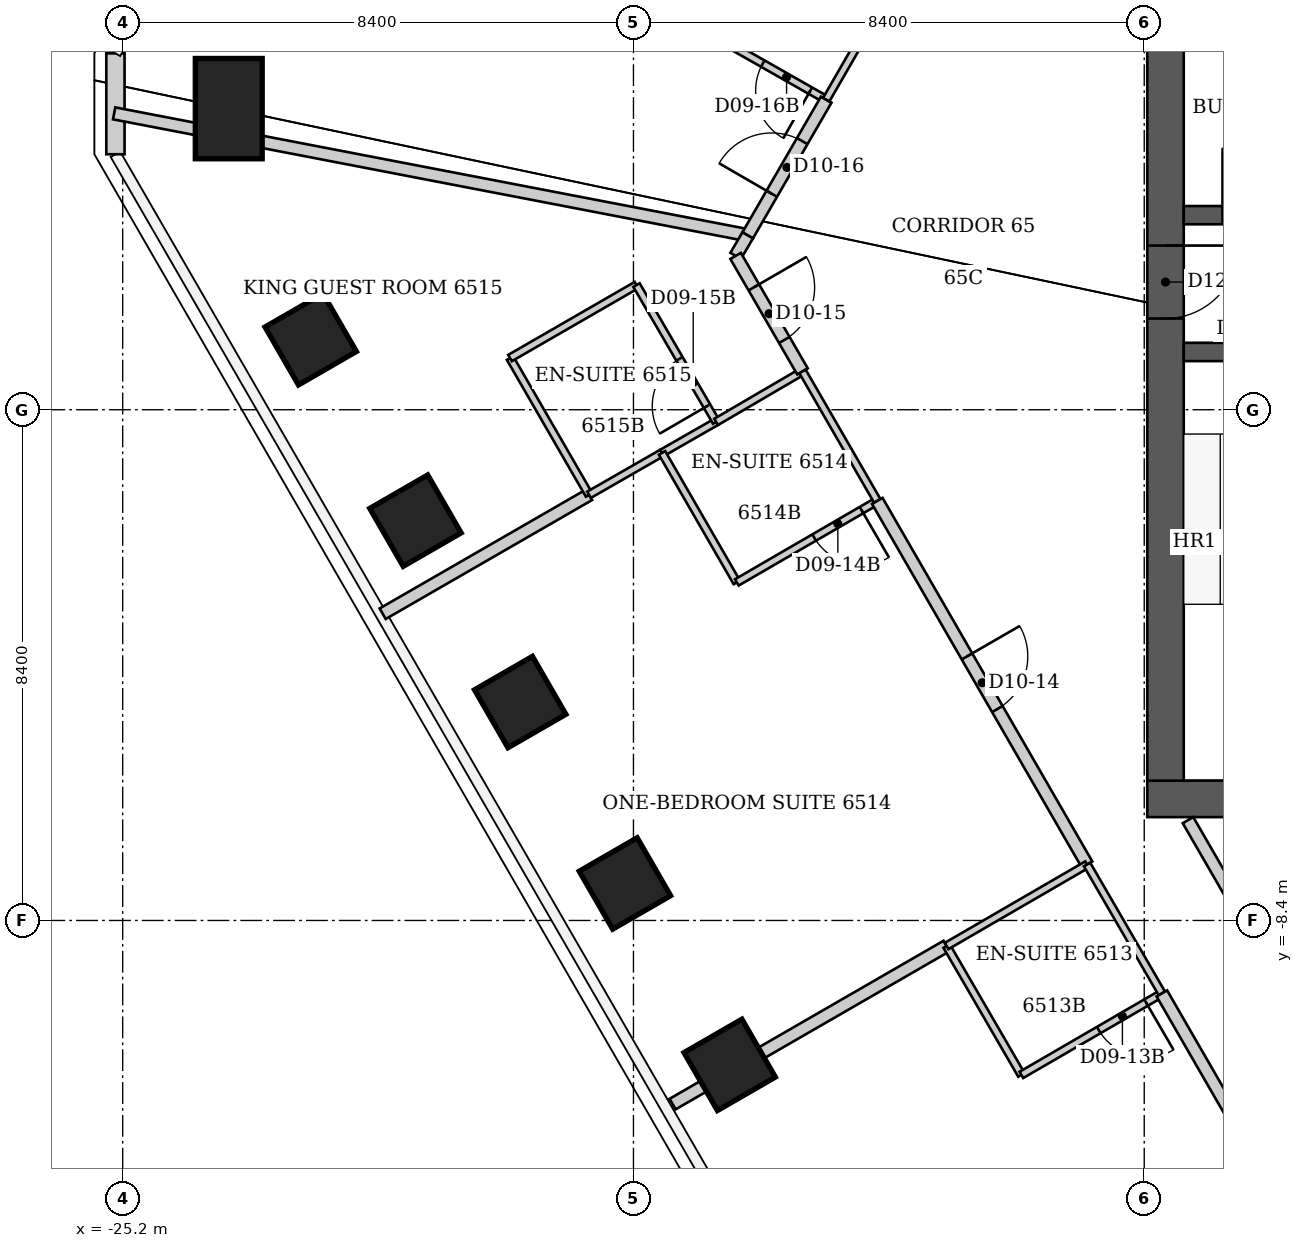
"""IFC4 building model, lengths in metres.
Left out: names, types, materials, properties, quantities, classifications, styles, units other than length and angle.
Written with IfcOpenShell. Run it as: python <this file> out.ifc"""

import sys

from ifc_helpers import new_model, si_unit, direction, frame, frame_2d, origin, origin_2d, place, context, subcontext, project, spatial, rectangle, extrude, element, fill, save


model = new_model("IFC4")
c1 = context("Model", 3, precision=1e-05, world=origin(), true_north=direction((0.0, 1.0)))
c2 = subcontext(c1, "Body", "Model", "MODEL_VIEW")
j1 = project(units=[si_unit("LENGTHUNIT", "METRE"), si_unit("PLANEANGLEUNIT", "RADIAN")], contexts=[c1])
p1 = place(None, origin())
s1 = spatial("IfcSite", under=j1, at=p1, CompositionType="ELEMENT")
p2 = place(p1, origin())
s2 = spatial("IfcBuilding", under=s1, at=p2, CompositionType="ELEMENT")
p3 = place(p2, frame((0.0, 0.0, 260.8)))
s3 = spatial("IfcBuildingStorey", under=s2, at=p3, CompositionType="ELEMENT", Elevation=260.8)
for number, where, z_axis, x_axis in (
    (1, (-15.218, -10.775, 0.0), (0.0, 0.0, 1.0), (-0.866, -0.5, 0.0)),
    (2, (-16.94, -7.792, 0.0), (0.0, 0.0, 1.0), (-0.866, -0.5, 0.0)),
    (3, (-18.663, -4.808, 0.0), (0.0, 0.0, 1.0), (-0.866, -0.5, 0.0)),
    (4, (-20.385, -1.824, 0.0), (0.0, 0.0, 1.0), (-0.866, -0.5, 0.0)),
    (5, (-22.108, 1.159, 0.0), (0.0, 0.0, 1.0), (-0.866, -0.5, 0.0)),
):
    element("IfcColumn", number, at=place(p3, frame(where, z_axis=z_axis, x_axis=x_axis)), inside=s3, PredefinedType="COLUMN", context=c2, shape_type="SweptSolid", body=[
        extrude(rectangle(XDim=1.1, YDim=1.1, at=origin_2d()), origin(), (0.0, 0.0, 1.0), 3.8),
    ])
p4 = place(p3, frame((-23.456, 4.952, 0.0), z_axis=(0.0, 0.0, 1.0), x_axis=(-1.0, 0.0, 0.0)))
e6 = element("IfcColumn", 6, at=p4, inside=s3, PredefinedType="COLUMN", context=c2, shape_type="SweptSolid", body=[
    extrude(rectangle(XDim=1.1, YDim=1.65, at=origin_2d()), origin(), (0.0, 0.0, 1.0), 3.8),
])
p5 = place(p3, frame((-8.35, -6.4, 0.0), z_axis=(0.0, 0.0, 1.0), x_axis=(1.0, 0.0, 0.0)))
e7 = element("IfcWall", 7, at=p5, inside=s3, PredefinedType="SHEAR", context=c2, shape_type="SweptSolid", body=[
    extrude(rectangle(XDim=16.7, YDim=0.6, at=frame_2d((8.35, 0.0))), origin(), (0.0, 0.0, 1.0), 3.8),
])
p6 = place(p3, frame((-8.05, -6.1, 0.0), z_axis=(0.0, 0.0, 1.0), x_axis=(0.0, 1.0, 0.0)))
e8 = element("IfcWall", 8, at=p6, inside=s3, PredefinedType="SHEAR", context=c2, shape_type="SweptSolid", body=[
    extrude(rectangle(XDim=12.2, YDim=0.6, at=frame_2d((6.1, 0.0))), origin(), (0.0, 0.0, 1.0), 3.8),
])
p7 = place(p6, frame((7.6, 0.0, 0.0)))
e9 = element("IfcOpeningElement", 9, at=p7, cuts=e8, PredefinedType="OPENING", context=c2, shape_type="SweptSolid", body=[
    extrude(rectangle(XDim=1.2, YDim=2.2, at=frame_2d((0.6, 1.1))), frame((0.0, 0.3, 0.0), z_axis=(0.0, -1.0, 0.0), x_axis=(1.0, 0.0, 0.0)), (0.0, 0.0, 1.0), 0.6),
])
p8 = place(p3, frame((-7.75, 0.95, 0.0), z_axis=(0.0, 0.0, 1.0), x_axis=(1.0, 0.0, 0.0)))
e10 = element("IfcWall", 10, at=p8, inside=s3, PredefinedType="SHEAR", context=c2, shape_type="SweptSolid", body=[
    extrude(rectangle(XDim=3.0, YDim=0.3, at=frame_2d((1.5, 0.0))), origin(), (0.0, 0.0, 1.0), 3.8),
])
p9 = place(p8, frame((0.85, 0.0, 0.0)))
e11 = element("IfcOpeningElement", 11, at=p9, cuts=e10, PredefinedType="OPENING", context=c2, shape_type="SweptSolid", body=[
    extrude(rectangle(XDim=1.0, YDim=2.2, at=frame_2d((0.5, 1.1))), frame((0.0, 0.15, 0.0), z_axis=(0.0, -1.0, 0.0), x_axis=(1.0, 0.0, 0.0)), (0.0, 0.0, 1.0), 0.3),
])
p10 = place(p3, frame((-7.75, 3.2, 0.0), z_axis=(0.0, 0.0, 1.0), x_axis=(1.0, 0.0, 0.0)))
e12 = element("IfcWall", 12, at=p10, inside=s3, PredefinedType="SHEAR", context=c2, shape_type="SweptSolid", body=[
    extrude(rectangle(XDim=15.5, YDim=0.3, at=frame_2d((7.75, 0.0))), origin(), (0.0, 0.0, 1.0), 3.8),
])
p11 = place(p10, frame((0.637, 0.0, 0.0)))
e13 = element("IfcOpeningElement", 13, at=p11, cuts=e12, PredefinedType="OPENING", context=c2, shape_type="SweptSolid", body=[
    extrude(rectangle(XDim=1.1, YDim=2.2, at=frame_2d((0.55, 1.1))), frame((0.0, 0.15, 0.0), z_axis=(0.0, -1.0, 0.0), x_axis=(1.0, 0.0, 0.0)), (0.0, 0.0, 1.0), 0.3),
])
p12 = place(p10, frame((3.262, 0.0, 0.0)))
e14 = element("IfcOpeningElement", 14, at=p12, cuts=e12, PredefinedType="OPENING", context=c2, shape_type="SweptSolid", body=[
    extrude(rectangle(XDim=1.1, YDim=2.2, at=frame_2d((0.55, 1.1))), frame((0.0, 0.15, 0.0), z_axis=(0.0, -1.0, 0.0), x_axis=(1.0, 0.0, 0.0)), (0.0, 0.0, 1.0), 0.3),
])
p13 = place(p3, frame((-25.319, 4.202, 0.0), z_axis=(0.0, 0.0, 1.0), x_axis=(0.0, 1.0, 0.0)))
e15 = element("IfcWall", 15, at=p13, inside=s3, PredefinedType="SOLIDWALL", context=c2, shape_type="SweptSolid", body=[
    extrude(rectangle(XDim=1.66, YDim=0.3, at=frame_2d((0.83, 0.0))), origin(), (0.0, 0.0, 1.0), 3.64),
])
p14 = place(p3, frame((-25.341, 4.874, 0.0), z_axis=(0.0, 0.0, 1.0), x_axis=(0.982001168061, -0.188874841966, 0.0)))
e16 = element("IfcWall", 16, at=p14, inside=s3, PredefinedType="PARTITIONING", context=c2, shape_type="SweptSolid", body=[
    extrude(rectangle(XDim=10.557, YDim=0.2, at=frame_2d((5.278, 0.0))), origin(), (0.0, 0.0, 1.0), 3.64),
])
p15 = place(p3, frame((-20.924, -3.355, 0.0), z_axis=(0.0, 0.0, 1.0), x_axis=(0.866380602512, 0.49938427247, 0.0)))
e17 = element("IfcWall", 17, at=p15, inside=s3, PredefinedType="PARTITIONING", context=c2, shape_type="SweptSolid", body=[
    extrude(rectangle(XDim=3.917, YDim=0.2, at=frame_2d((1.958, 0.0))), origin(), (0.0, 0.0, 1.0), 3.64),
])
p16 = place(p3, frame((-18.83, 0.85, 0.0), z_axis=(0.0, 0.0, 1.0), x_axis=(0.50025099007, -0.865880446098, 0.0)))
e18 = element("IfcWall", 18, at=p16, inside=s3, PredefinedType="PARTITIONING", context=c2, shape_type="SweptSolid", body=[
    extrude(rectangle(XDim=2.599, YDim=0.12, at=frame_2d((1.299, 0.0))), origin(), (0.0, 0.0, 1.0), 3.64),
])
p17 = place(p3, frame((-17.531, -1.399, 0.0), z_axis=(0.0, 0.0, 1.0), x_axis=(0.867308096735, 0.497771700017, 0.0)))
e19 = element("IfcWall", 19, at=p17, inside=s3, PredefinedType="PARTITIONING", context=c2, shape_type="SweptSolid", body=[
    extrude(rectangle(XDim=1.384, YDim=0.12, at=frame_2d((0.692, 0.0))), origin(), (0.0, 0.0, 1.0), 3.64),
])
p18 = place(p3, frame((-16.75, 2.05, 0.0), z_axis=(0.0, 0.0, 1.0), x_axis=(-0.866202511239, -0.499693115345, 0.0)))
e20 = element("IfcWall", 20, at=p18, inside=s3, PredefinedType="PARTITIONING", context=c2, shape_type="SweptSolid", body=[
    extrude(rectangle(XDim=2.401, YDim=0.12, at=frame_2d((1.201, 0.0))), origin(), (0.0, 0.0, 1.0), 3.64),
])
p19 = place(p3, frame((-16.33, -0.71, 0.0), z_axis=(0.0, 0.0, 1.0), x_axis=(0.867671417222, 0.497138121387, 0.0)))
e21 = element("IfcWall", 21, at=p19, inside=s3, PredefinedType="PARTITIONING", context=c2, shape_type="SweptSolid", body=[
    extrude(rectangle(XDim=1.026, YDim=0.12, at=frame_2d((0.513, 0.0))), origin(), (0.0, 0.0, 1.0), 3.64),
])
p20 = place(p3, frame((-16.33, -0.71, 0.0), z_axis=(0.0, 0.0, 1.0), x_axis=(0.500046071023, -0.865998803033, 0.0)))
e22 = element("IfcWall", 22, at=p20, inside=s3, PredefinedType="PARTITIONING", context=c2, shape_type="SweptSolid", body=[
    extrude(rectangle(XDim=2.46, YDim=0.12, at=frame_2d((1.23, 0.0))), origin(), (0.0, 0.0, 1.0), 3.64),
])
p21 = place(p3, frame((-16.156, -11.42, 0.0), z_axis=(0.0, 0.0, 1.0), x_axis=(0.866170741273, 0.499748183552, 0.0)))
e23 = element("IfcWall", 23, at=p21, inside=s3, PredefinedType="PARTITIONING", context=c2, shape_type="SweptSolid", body=[
    extrude(rectangle(XDim=5.202, YDim=0.2, at=frame_2d((2.601, 0.0))), origin(), (0.0, 0.0, 1.0), 3.64),
])
p22 = place(p3, frame((-15.9, 6.39, 0.0), z_axis=(0.0, 0.0, 1.0), x_axis=(0.869431908012, -0.494052787999, 0.0)))
e24 = element("IfcWall", 24, at=p22, inside=s3, PredefinedType="PARTITIONING", context=c2, shape_type="SweptSolid", body=[
    extrude(rectangle(XDim=2.611, YDim=0.12, at=frame_2d((1.305, 0.0))), origin(), (0.0, 0.0, 1.0), 3.64),
])
p23 = place(p22, frame((1.411, 0.0, 0.0)))
e25 = element("IfcOpeningElement", 25, at=p23, cuts=e24, PredefinedType="OPENING", context=c2, shape_type="SweptSolid", body=[
    extrude(rectangle(XDim=0.9, YDim=2.03, at=frame_2d((0.45, 1.015))), frame((0.0, 0.06, 0.0), z_axis=(0.0, -1.0, 0.0), x_axis=(1.0, 0.0, 0.0)), (0.0, 0.0, 1.0), 0.12),
])
p24 = place(p3, frame((-15.44, -0.2, 0.0), z_axis=(0.0, 0.0, 1.0), x_axis=(-0.503171227198, 0.864186736834, 0.0)))
e26 = element("IfcWall", 26, at=p24, inside=s3, PredefinedType="PARTITIONING", context=c2, shape_type="SweptSolid", body=[
    extrude(rectangle(XDim=2.604, YDim=0.12, at=frame_2d((1.302, 0.0))), origin(), (0.0, 0.0, 1.0), 3.64),
])
p25 = place(p24, frame((0.3, 0.0, 0.0)))
e27 = element("IfcOpeningElement", 27, at=p25, cuts=e26, PredefinedType="OPENING", context=c2, shape_type="SweptSolid", body=[
    extrude(rectangle(XDim=0.9, YDim=2.03, at=frame_2d((0.45, 1.015))), frame((0.0, 0.06, 0.0), z_axis=(0.0, -1.0, 0.0), x_axis=(1.0, 0.0, 0.0)), (0.0, 0.0, 1.0), 0.12),
])
p26 = place(p3, frame((-15.44, -0.2, 0.0), z_axis=(0.0, 0.0, 1.0), x_axis=(0.863304753898, 0.504682971673, 0.0)))
e28 = element("IfcWall", 28, at=p26, inside=s3, PredefinedType="PARTITIONING", context=c2, shape_type="SweptSolid", body=[
    extrude(rectangle(XDim=1.645, YDim=0.12, at=frame_2d((0.822, 0.0))), origin(), (0.0, 0.0, 1.0), 3.64),
])
p27 = place(p3, frame((-15.12, 2.53, 0.0), z_axis=(0.0, 0.0, 1.0), x_axis=(0.507290461451, 0.861775137562, 0.0)))
e29 = element("IfcWall", 29, at=p27, inside=s3, PredefinedType="PARTITIONING", context=c2, shape_type="SweptSolid", body=[
    extrude(rectangle(XDim=0.395, YDim=0.2, at=frame_2d((0.197, 0.0))), origin(), (0.0, 0.0, 1.0), 3.64),
])
p28 = place(p3, frame((-15.12, 2.53, 0.0), z_axis=(0.0, 0.0, 1.0), x_axis=(0.501088872721, -0.865395829453, 0.0)))
e30 = element("IfcWall", 30, at=p28, inside=s3, PredefinedType="PARTITIONING", context=c2, shape_type="SweptSolid", body=[
    extrude(rectangle(XDim=2.195, YDim=0.2, at=frame_2d((1.098, 0.0))), origin(), (0.0, 0.0, 1.0), 3.64),
])
p29 = place(p28, frame((0.598, 0.0, 0.0)))
e31 = element("IfcOpeningElement", 31, at=p29, cuts=e30, PredefinedType="OPENING", context=c2, shape_type="SweptSolid", body=[
    extrude(rectangle(XDim=1.0, YDim=2.13, at=frame_2d((0.5, 1.065))), frame((0.0, 0.1, 0.0), z_axis=(0.0, -1.0, 0.0), x_axis=(1.0, 0.0, 0.0)), (0.0, 0.0, 1.0), 0.2),
])
p30 = place(p3, frame((-15.1, -2.84, 0.0), z_axis=(0.0, 0.0, 1.0), x_axis=(0.86498992408, 0.501789229896, 0.0)))
e32 = element("IfcWall", 32, at=p30, inside=s3, PredefinedType="PARTITIONING", context=c2, shape_type="SweptSolid", body=[
    extrude(rectangle(XDim=2.671, YDim=0.12, at=frame_2d((1.335, 0.0))), origin(), (0.0, 0.0, 1.0), 3.023),
])
p31 = place(p30, frame((1.47, 0.0, 0.0)))
e33 = element("IfcOpeningElement", 33, at=p31, cuts=e32, PredefinedType="OPENING", context=c2, shape_type="SweptSolid", body=[
    extrude(rectangle(XDim=0.9, YDim=2.03, at=frame_2d((0.45, 1.015))), frame((0.0, 0.06, 0.0), z_axis=(0.0, -1.0, 0.0), x_axis=(1.0, 0.0, 0.0)), (0.0, 0.0, 1.0), 0.12),
])
p32 = place(p3, frame((-14.92, 2.87, 0.0), z_axis=(0.0, 0.0, 1.0), x_axis=(0.500714932888, 0.865612243434, 0.0)))
e34 = element("IfcWall", 34, at=p32, inside=s3, PredefinedType="PARTITIONING", context=c2, shape_type="SweptSolid", body=[
    extrude(rectangle(XDim=2.576, YDim=0.2, at=frame_2d((1.288, 0.0))), origin(), (0.0, 0.0, 1.0), 3.64),
])
p33 = place(p32, frame((0.788, 0.0, 0.0)))
e35 = element("IfcOpeningElement", 35, at=p33, cuts=e34, PredefinedType="OPENING", context=c2, shape_type="SweptSolid", body=[
    extrude(rectangle(XDim=1.0, YDim=2.13, at=frame_2d((0.5, 1.065))), frame((0.0, 0.1, 0.0), z_axis=(0.0, -1.0, 0.0), x_axis=(1.0, 0.0, 0.0)), (0.0, 0.0, 1.0), 0.2),
])
p34 = place(p3, frame((-14.02, 0.63, 0.0), z_axis=(0.0, 0.0, 1.0), x_axis=(0.500089055364, -0.86597398154, 0.0)))
e36 = element("IfcWall", 36, at=p34, inside=s3, PredefinedType="PARTITIONING", context=c2, shape_type="SweptSolid", body=[
    extrude(rectangle(XDim=2.459, YDim=0.12, at=frame_2d((1.23, 0.0))), origin(), (0.0, 0.0, 1.0), 3.64),
])
p35 = place(p3, frame((-13.63, 5.1, 0.0), z_axis=(0.0, 0.0, 1.0), x_axis=(0.499737123639, 0.866177122335, 0.0)))
e37 = element("IfcWall", 37, at=p35, inside=s3, PredefinedType="PARTITIONING", context=c2, shape_type="SweptSolid", body=[
    extrude(rectangle(XDim=2.401, YDim=0.12, at=frame_2d((1.201, 0.0))), origin(), (0.0, 0.0, 1.0), 3.64),
])
p36 = place(p3, frame((-12.79, -1.5, 0.0), z_axis=(0.0, 0.0, 1.0), x_axis=(0.499718371597, -0.866187940974, 0.0)))
e38 = element("IfcWall", 38, at=p36, inside=s3, PredefinedType="PARTITIONING", context=c2, shape_type="SweptSolid", body=[
    extrude(rectangle(XDim=6.904, YDim=0.2, at=frame_2d((3.452, 0.0))), origin(), (0.0, 0.0, 1.0), 3.64),
])
p37 = place(p36, frame((2.952, 0.0, 0.0)))
e39 = element("IfcOpeningElement", 39, at=p37, cuts=e38, PredefinedType="OPENING", context=c2, shape_type="SweptSolid", body=[
    extrude(rectangle(XDim=1.0, YDim=2.13, at=frame_2d((0.5, 1.065))), frame((0.0, 0.1, 0.0), z_axis=(0.0, -1.0, 0.0), x_axis=(1.0, 0.0, 0.0)), (0.0, 0.0, 1.0), 0.2),
])
p38 = place(p3, frame((-11.65, -8.82, 0.0), z_axis=(0.0, 0.0, 1.0), x_axis=(0.501856726365, -0.86495076519, 0.0)))
e40 = element("IfcWall", 40, at=p38, inside=s3, PredefinedType="PARTITIONING", context=c2, shape_type="SweptSolid", body=[
    extrude(rectangle(XDim=2.451, YDim=0.12, at=frame_2d((1.226, 0.0))), origin(), (0.0, 0.0, 1.0), 3.64),
])
p39 = place(p3, frame((-11.65, -8.82, 0.0), z_axis=(0.0, 0.0, 1.0), x_axis=(0.864966903181, 0.501828911485, 0.0)))
e41 = element("IfcWall", 41, at=p39, inside=s3, PredefinedType="PARTITIONING", context=c2, shape_type="SweptSolid", body=[
    extrude(rectangle(XDim=2.67, YDim=0.12, at=frame_2d((1.335, 0.0))), origin(), (0.0, 0.0, 1.0), 3.038),
])
p40 = place(p3, frame((-10.42, -10.94, 0.0), z_axis=(0.0, 0.0, 1.0), x_axis=(0.865006586495, 0.501760505939, 0.0)))
e42 = element("IfcWall", 42, at=p40, inside=s3, PredefinedType="PARTITIONING", context=c2, shape_type="SweptSolid", body=[
    extrude(rectangle(XDim=2.67, YDim=0.12, at=frame_2d((1.335, 0.0))), origin(), (0.0, 0.0, 1.0), 3.64),
])
p41 = place(p40, frame((1.47, 0.0, 0.0)))
e43 = element("IfcOpeningElement", 43, at=p41, cuts=e42, PredefinedType="OPENING", context=c2, shape_type="SweptSolid", body=[
    extrude(rectangle(XDim=0.9, YDim=2.03, at=frame_2d((0.45, 1.015))), frame((0.0, 0.06, 0.0), z_axis=(0.0, -1.0, 0.0), x_axis=(1.0, 0.0, 0.0)), (0.0, 0.0, 1.0), 0.12),
])
p42 = place(p3, frame((-9.34, -7.48, 0.0), z_axis=(0.0, 0.0, 1.0), x_axis=(0.501813488763, -0.864975850817, 0.0)))
e44 = element("IfcWall", 44, at=p42, inside=s3, PredefinedType="PARTITIONING", context=c2, shape_type="SweptSolid", body=[
    extrude(rectangle(XDim=2.451, YDim=0.12, at=frame_2d((1.226, 0.0))), origin(), (0.0, 0.0, 1.0), 3.64),
])
p43 = place(p3, frame((-8.11, -9.6, 0.0), z_axis=(0.0, 0.0, 1.0), x_axis=(0.49991915452, -0.866072074913, 0.0)))
e45 = element("IfcWall", 45, at=p43, inside=s3, PredefinedType="PARTITIONING", context=c2, shape_type="SweptSolid", body=[
    extrude(rectangle(XDim=5.981, YDim=0.2, at=frame_2d((2.99, 0.0))), origin(), (0.0, 0.0, 1.0), 3.64),
])
p44 = place(p43, frame((2.49, 0.0, 0.0)))
e46 = element("IfcOpeningElement", 46, at=p44, cuts=e45, PredefinedType="OPENING", context=c2, shape_type="SweptSolid", body=[
    extrude(rectangle(XDim=1.0, YDim=2.13, at=frame_2d((0.5, 1.065))), frame((0.0, 0.1, 0.0), z_axis=(0.0, -1.0, 0.0), x_axis=(1.0, 0.0, 0.0)), (0.0, 0.0, 1.0), 0.2),
])
p45 = place(p3, frame((-4.0, -13.12, 0.0), z_axis=(0.0, 0.0, 1.0), x_axis=(-0.500218436225, 0.865899252835, 0.0)))
e47 = element("IfcWall", 47, at=p45, inside=s3, PredefinedType="PARTITIONING", context=c2, shape_type="SweptSolid", body=[
    extrude(rectangle(XDim=7.357, YDim=0.2, at=frame_2d((3.678, 0.0))), origin(), (0.0, 0.0, 1.0), 3.64),
])
p46 = place(p45, frame((3.128, 0.0, 0.0)))
e48 = element("IfcOpeningElement", 48, at=p46, cuts=e47, PredefinedType="OPENING", context=c2, shape_type="SweptSolid", body=[
    extrude(rectangle(XDim=1.1, YDim=2.2, at=frame_2d((0.55, 1.1))), frame((0.0, 0.1, 0.0), z_axis=(0.0, -1.0, 0.0), x_axis=(1.0, 0.0, 0.0)), (0.0, 0.0, 1.0), 0.2),
])
p47 = place(p41, origin())
e49 = element("IfcDoor", 49, at=p47, inside=s3, OperationType="SINGLE_SWING_RIGHT", PredefinedType="DOOR", context=c2, shape_type="SweptSolid", body=[
    extrude(rectangle(XDim=0.9, YDim=2.03, at=frame_2d((0.45, 1.015))), frame((0.0, 0.025, 0.0), z_axis=(0.0, -1.0, 0.0), x_axis=(1.0, 0.0, 0.0)), (0.0, 0.0, 1.0), 0.05),
])
fill(e43, e49)
p48 = place(p37, origin())
e50 = element("IfcDoor", 50, at=p48, inside=s3, OperationType="SINGLE_SWING_LEFT", PredefinedType="DOOR", context=c2, shape_type="SweptSolid", body=[
    extrude(rectangle(XDim=1.0, YDim=2.13, at=frame_2d((0.5, 1.065))), frame((0.0, 0.025, 0.0), z_axis=(0.0, -1.0, 0.0), x_axis=(1.0, 0.0, 0.0)), (0.0, 0.0, 1.0), 0.05),
])
fill(e39, e50)
p49 = place(p31, origin())
e51 = element("IfcDoor", 51, at=p49, inside=s3, OperationType="SINGLE_SWING_RIGHT", PredefinedType="DOOR", context=c2, shape_type="SweptSolid", body=[
    extrude(rectangle(XDim=0.9, YDim=2.03, at=frame_2d((0.45, 1.015))), frame((0.0, 0.025, 0.0), z_axis=(0.0, -1.0, 0.0), x_axis=(1.0, 0.0, 0.0)), (0.0, 0.0, 1.0), 0.05),
])
fill(e33, e51)
p50 = place(p29, origin())
e52 = element("IfcDoor", 52, at=p50, inside=s3, OperationType="SINGLE_SWING_LEFT", PredefinedType="DOOR", context=c2, shape_type="SweptSolid", body=[
    extrude(rectangle(XDim=1.0, YDim=2.13, at=frame_2d((0.5, 1.065))), frame((0.0, 0.025, 0.0), z_axis=(0.0, -1.0, 0.0), x_axis=(1.0, 0.0, 0.0)), (0.0, 0.0, 1.0), 0.05),
])
fill(e31, e52)
p51 = place(p25, origin())
e53 = element("IfcDoor", 53, at=p51, inside=s3, OperationType="SINGLE_SWING_LEFT", PredefinedType="DOOR", context=c2, shape_type="SweptSolid", body=[
    extrude(rectangle(XDim=0.9, YDim=2.03, at=frame_2d((0.45, 1.015))), frame((0.0, 0.025, 0.0), z_axis=(0.0, -1.0, 0.0), x_axis=(1.0, 0.0, 0.0)), (0.0, 0.0, 1.0), 0.05),
])
fill(e27, e53)
p52 = place(p33, origin())
e54 = element("IfcDoor", 54, at=p52, inside=s3, OperationType="SINGLE_SWING_LEFT", PredefinedType="DOOR", context=c2, shape_type="SweptSolid", body=[
    extrude(rectangle(XDim=1.0, YDim=2.13, at=frame_2d((0.5, 1.065))), frame((0.0, 0.025, 0.0), z_axis=(0.0, -1.0, 0.0), x_axis=(1.0, 0.0, 0.0)), (0.0, 0.0, 1.0), 0.05),
])
fill(e35, e54)
p53 = place(p23, origin())
e55 = element("IfcDoor", 55, at=p53, inside=s3, OperationType="SINGLE_SWING_RIGHT", PredefinedType="DOOR", context=c2, shape_type="SweptSolid", body=[
    extrude(rectangle(XDim=0.9, YDim=2.03, at=frame_2d((0.45, 1.015))), frame((0.0, 0.025, 0.0), z_axis=(0.0, -1.0, 0.0), x_axis=(1.0, 0.0, 0.0)), (0.0, 0.0, 1.0), 0.05),
])
fill(e25, e55)
p54 = place(p7, origin())
e56 = element("IfcDoor", 56, at=p54, inside=s3, OperationType="SINGLE_SWING_RIGHT", PredefinedType="DOOR", context=c2, shape_type="SweptSolid", body=[
    extrude(rectangle(XDim=1.2, YDim=2.2, at=frame_2d((0.6, 1.1))), frame((0.0, 0.025, 0.0), z_axis=(0.0, -1.0, 0.0), x_axis=(1.0, 0.0, 0.0)), (0.0, 0.0, 1.0), 0.05),
])
fill(e9, e56)
p55 = place(p11, origin())
e57 = element("IfcDoor", 57, at=p55, inside=s3, OperationType="SINGLE_SWING_LEFT", PredefinedType="DOOR", context=c2, shape_type="SweptSolid", body=[
    extrude(rectangle(XDim=1.1, YDim=2.2, at=frame_2d((0.55, 1.1))), frame((0.0, 0.025, 0.0), z_axis=(0.0, -1.0, 0.0), x_axis=(1.0, 0.0, 0.0)), (0.0, 0.0, 1.0), 0.05),
])
fill(e13, e57)
save(model, sys.argv[1])
